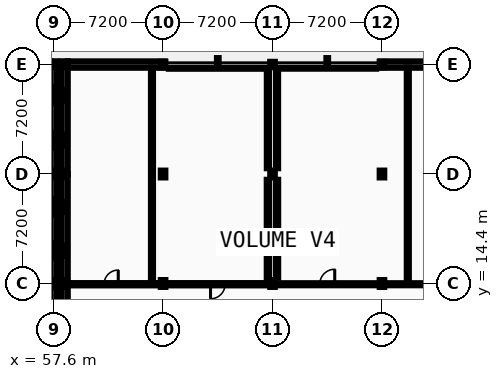
"""IFC4 building model, lengths in metres.
Left out: names, types, materials, properties, quantities, classifications, styles, units other than length and angle.
Written with IfcOpenShell. Run it as: python <this file> out.ifc"""

import sys

from ifc_helpers import new_model, si_unit, direction, frame, frame_2d, origin, origin_2d, place, context, subcontext, project, spatial, rectangle, i_section, extrude, element, fill, save


model = new_model("IFC4")
c1 = context("Model", 3, precision=1e-05, world=origin(), true_north=direction((0.0, 1.0)))
c2 = subcontext(c1, "Body", "Model", "MODEL_VIEW")
j1 = project(units=[si_unit("LENGTHUNIT", "METRE"), si_unit("PLANEANGLEUNIT", "RADIAN")], contexts=[c1])
p1 = place(None, origin())
s1 = spatial("IfcSite", under=j1, at=p1, CompositionType="ELEMENT")
p2 = place(p1, origin())
s2 = spatial("IfcBuilding", under=s1, at=p2, CompositionType="ELEMENT")
p3 = place(p2, origin())
s3 = spatial("IfcBuildingStorey", under=s2, at=p3, CompositionType="ELEMENT", Elevation=0.0)
for number, where, z_axis, x_axis in (
    (1, (57.6, 14.4, 0.0), (0.0, 0.0, 1.0), (1.0, 0.0, 0.0)),
    (2, (57.6, 21.6, 0.0), (0.0, 0.0, 1.0), (1.0, 0.0, 0.0)),
):
    element("IfcColumn", number, at=place(p3, frame(where, z_axis=z_axis, x_axis=x_axis)), inside=s3, PredefinedType="COLUMN", context=c2, shape_type="SweptSolid", body=[
        extrude(i_section(OverallWidth=0.3, OverallDepth=0.45, WebThickness=0.014, FlangeThickness=0.026, FilletRadius=0.027, at=origin_2d()), origin(), (0.0, 0.0, 1.0), 5.2),
    ])
p4 = place(p3, frame((57.6, 28.8, 0.0), z_axis=(0.0, 0.0, 1.0), x_axis=(1.0, 0.0, 0.0)))
e3 = element("IfcColumn", 3, at=p4, inside=s3, PredefinedType="COLUMN", context=c2, shape_type="SweptSolid", body=[
    extrude(i_section(OverallWidth=0.3, OverallDepth=0.36, WebThickness=0.012, FlangeThickness=0.022, FilletRadius=0.027, at=origin_2d()), origin(), (0.0, 0.0, 1.0), 5.2),
])
for number, where, z_axis, x_axis in (
    (4, (58.32, 14.4, 0.0), (0.0, 0.0, 1.0), (1.0, 0.0, 0.0)),
    (5, (58.32, 21.6, 0.0), (0.0, 0.0, 1.0), (1.0, 0.0, 0.0)),
):
    element("IfcColumn", number, at=place(p3, frame(where, z_axis=z_axis, x_axis=x_axis)), inside=s3, PredefinedType="COLUMN", context=c2, shape_type="SweptSolid", body=[
        extrude(i_section(OverallWidth=0.3, OverallDepth=0.45, WebThickness=0.014, FlangeThickness=0.026, FilletRadius=0.027, at=origin_2d()), origin(), (0.0, 0.0, 1.0), 5.2),
    ])
p5 = place(p3, frame((58.32, 28.8, 0.0), z_axis=(0.0, 0.0, 1.0), x_axis=(1.0, 0.0, 0.0)))
e6 = element("IfcColumn", 6, at=p5, inside=s3, PredefinedType="COLUMN", context=c2, shape_type="SweptSolid", body=[
    extrude(i_section(OverallWidth=0.3, OverallDepth=0.36, WebThickness=0.012, FlangeThickness=0.022, FilletRadius=0.027, at=origin_2d()), origin(), (0.0, 0.0, 1.0), 5.2),
])
for number, where, z_axis, x_axis in (
    (7, (64.8, 14.4, 0.0), (0.0, 0.0, 1.0), (1.0, 0.0, 0.0)),
    (8, (64.8, 21.6, 0.0), (0.0, 0.0, 1.0), (1.0, 0.0, 0.0)),
):
    element("IfcColumn", number, at=place(p3, frame(where, z_axis=z_axis, x_axis=x_axis)), inside=s3, PredefinedType="COLUMN", context=c2, shape_type="SweptSolid", body=[
        extrude(i_section(OverallWidth=0.3, OverallDepth=0.45, WebThickness=0.014, FlangeThickness=0.026, FilletRadius=0.027, at=origin_2d()), origin(), (0.0, 0.0, 1.0), 5.2),
    ])
p6 = place(p3, frame((64.8, 28.8, 0.0), z_axis=(0.0, 0.0, 1.0), x_axis=(1.0, 0.0, 0.0)))
e9 = element("IfcColumn", 9, at=p6, inside=s3, PredefinedType="COLUMN", context=c2, shape_type="SweptSolid", body=[
    extrude(i_section(OverallWidth=0.3, OverallDepth=0.36, WebThickness=0.012, FlangeThickness=0.022, FilletRadius=0.027, at=origin_2d()), origin(), (0.0, 0.0, 1.0), 5.2),
])
for number, where, z_axis, x_axis in (
    (10, (72.0, 14.4, 0.0), (0.0, 0.0, 1.0), (1.0, 0.0, 0.0)),
    (11, (72.0, 21.6, 0.0), (0.0, 0.0, 1.0), (1.0, 0.0, 0.0)),
):
    element("IfcColumn", number, at=place(p3, frame(where, z_axis=z_axis, x_axis=x_axis)), inside=s3, PredefinedType="COLUMN", context=c2, shape_type="SweptSolid", body=[
        extrude(i_section(OverallWidth=0.3, OverallDepth=0.45, WebThickness=0.014, FlangeThickness=0.026, FilletRadius=0.027, at=origin_2d()), origin(), (0.0, 0.0, 1.0), 5.2),
    ])
p7 = place(p3, frame((72.0, 28.8, 0.0), z_axis=(0.0, 0.0, 1.0), x_axis=(1.0, 0.0, 0.0)))
e12 = element("IfcColumn", 12, at=p7, inside=s3, PredefinedType="COLUMN", context=c2, shape_type="SweptSolid", body=[
    extrude(i_section(OverallWidth=0.3, OverallDepth=0.36, WebThickness=0.012, FlangeThickness=0.022, FilletRadius=0.027, at=origin_2d()), origin(), (0.0, 0.0, 1.0), 5.2),
])
for number, where, z_axis, x_axis in (
    (13, (79.2, 14.4, 0.0), (0.0, 0.0, 1.0), (1.0, 0.0, 0.0)),
    (14, (79.2, 21.6, 0.0), (0.0, 0.0, 1.0), (1.0, 0.0, 0.0)),
):
    element("IfcColumn", number, at=place(p3, frame(where, z_axis=z_axis, x_axis=x_axis)), inside=s3, PredefinedType="COLUMN", context=c2, shape_type="SweptSolid", body=[
        extrude(i_section(OverallWidth=0.3, OverallDepth=0.45, WebThickness=0.014, FlangeThickness=0.026, FilletRadius=0.027, at=origin_2d()), origin(), (0.0, 0.0, 1.0), 5.2),
    ])
p8 = place(p3, frame((79.2, 28.8, 0.0), z_axis=(0.0, 0.0, 1.0), x_axis=(1.0, 0.0, 0.0)))
e15 = element("IfcColumn", 15, at=p8, inside=s3, PredefinedType="COLUMN", context=c2, shape_type="SweptSolid", body=[
    extrude(i_section(OverallWidth=0.3, OverallDepth=0.36, WebThickness=0.012, FlangeThickness=0.022, FilletRadius=0.027, at=origin_2d()), origin(), (0.0, 0.0, 1.0), 5.2),
])
p9 = place(p3, frame((57.6, 8.9, 0.0), z_axis=(0.0, 0.0, 1.0), x_axis=(0.0, 1.0, 0.0)))
e16 = element("IfcWall", 16, at=p9, inside=s3, PredefinedType="STANDARD", context=c2, shape_type="SweptSolid", body=[
    extrude(rectangle(XDim=5.5, YDim=0.42, at=frame_2d((2.75, 0.0))), origin(), (0.0, 0.0, 1.0), 4.97),
])
p10 = place(p3, frame((57.6, 14.4, 0.0), z_axis=(0.0, 0.0, 1.0), x_axis=(0.0, 1.0, 0.0)))
e17 = element("IfcWall", 17, at=p10, inside=s3, PredefinedType="STANDARD", context=c2, shape_type="SweptSolid", body=[
    extrude(rectangle(XDim=7.2, YDim=0.42, at=frame_2d((3.6, 0.0))), origin(), (0.0, 0.0, 1.0), 4.665),
])
p11 = place(p10, frame((1.56, 0.0, 0.95)))
e18 = element("IfcOpeningElement", 18, at=p11, cuts=e17, PredefinedType="OPENING", context=c2, shape_type="SweptSolid", body=[
    extrude(rectangle(XDim=1.2, YDim=1.296, at=frame_2d((0.6, 0.648))), frame((0.0, 0.22, 0.0), z_axis=(0.0, -1.0, 0.0), x_axis=(1.0, 0.0, 0.0)), (0.0, 0.0, 1.0), 0.44),
])
p12 = place(p10, frame((4.44, 0.0, 0.95)))
e19 = element("IfcOpeningElement", 19, at=p12, cuts=e17, PredefinedType="OPENING", context=c2, shape_type="SweptSolid", body=[
    extrude(rectangle(XDim=1.2, YDim=1.296, at=frame_2d((0.6, 0.648))), frame((0.0, 0.22, 0.0), z_axis=(0.0, -1.0, 0.0), x_axis=(1.0, 0.0, 0.0)), (0.0, 0.0, 1.0), 0.44),
])
p13 = place(p3, frame((57.6, 21.6, 0.0), z_axis=(0.0, 0.0, 1.0), x_axis=(0.0, 1.0, 0.0)))
e20 = element("IfcWall", 20, at=p13, inside=s3, PredefinedType="STANDARD", context=c2, shape_type="SweptSolid", body=[
    extrude(rectangle(XDim=7.41, YDim=0.42, at=frame_2d((3.705, 0.0))), origin(), (0.0, 0.0, 1.0), 4.665),
])
p14 = place(p13, frame((1.606, 0.0, 0.95)))
e21 = element("IfcOpeningElement", 21, at=p14, cuts=e20, PredefinedType="OPENING", context=c2, shape_type="SweptSolid", body=[
    extrude(rectangle(XDim=1.234, YDim=1.296, at=frame_2d((0.617, 0.648))), frame((0.0, 0.22, 0.0), z_axis=(0.0, -1.0, 0.0), x_axis=(1.0, 0.0, 0.0)), (0.0, 0.0, 1.0), 0.44),
])
p15 = place(p13, frame((4.57, 0.0, 0.95)))
e22 = element("IfcOpeningElement", 22, at=p15, cuts=e20, PredefinedType="OPENING", context=c2, shape_type="SweptSolid", body=[
    extrude(rectangle(XDim=1.234, YDim=1.296, at=frame_2d((0.617, 0.648))), frame((0.0, 0.22, 0.0), z_axis=(0.0, -1.0, 0.0), x_axis=(1.0, 0.0, 0.0)), (0.0, 0.0, 1.0), 0.44),
])
p16 = place(p3, frame((64.91, 28.8, 0.0), z_axis=(0.0, 0.0, 1.0), x_axis=(-1.0, 0.0, 0.0)))
e23 = element("IfcWall", 23, at=p16, inside=s3, PredefinedType="STANDARD", context=c2, shape_type="SweptSolid", body=[
    extrude(rectangle(XDim=6.38, YDim=0.42, at=frame_2d((3.19, 0.0))), origin(), (0.0, 0.0, 1.0), 4.665),
])
p17 = place(p3, frame((86.61, 28.8, 0.0), z_axis=(0.0, 0.0, 1.0), x_axis=(-1.0, 0.0, 0.0)))
e24 = element("IfcWall", 24, at=p17, inside=s3, PredefinedType="STANDARD", context=c2, shape_type="SweptSolid", body=[
    extrude(rectangle(XDim=7.52, YDim=0.42, at=frame_2d((3.76, 0.0))), origin(), (0.0, 0.0, 1.0), 4.665),
])
p18 = place(p17, frame((1.456, 0.0, 1.2)))
e25 = element("IfcOpeningElement", 25, at=p18, cuts=e24, PredefinedType="OPENING", context=c2, shape_type="SweptSolid", body=[
    extrude(rectangle(XDim=1.6, YDim=1.4, at=frame_2d((0.8, 0.7))), frame((0.0, 0.22, 0.0), z_axis=(0.0, -1.0, 0.0), x_axis=(1.0, 0.0, 0.0)), (0.0, 0.0, 1.0), 0.44),
])
p19 = place(p3, frame((58.32, 14.4, 0.0), z_axis=(0.0, 0.0, 1.0), x_axis=(0.0, -1.0, 0.0)))
e26 = element("IfcWall", 26, at=p19, inside=s3, PredefinedType="STANDARD", context=c2, shape_type="SweptSolid", body=[
    extrude(rectangle(XDim=5.5, YDim=0.42, at=frame_2d((2.75, 0.0))), origin(), (0.0, 0.0, 1.0), 4.97),
])
p20 = place(p3, frame((58.32, 21.6, 0.0), z_axis=(0.0, 0.0, 1.0), x_axis=(0.0, -1.0, 0.0)))
e27 = element("IfcWall", 27, at=p20, inside=s3, PredefinedType="STANDARD", context=c2, shape_type="SweptSolid", body=[
    extrude(rectangle(XDim=7.2, YDim=0.42, at=frame_2d((3.6, 0.0))), origin(), (0.0, 0.0, 1.0), 4.665),
])
p21 = place(p20, frame((1.713, 0.0, 0.95)))
e28 = element("IfcOpeningElement", 28, at=p21, cuts=e27, PredefinedType="OPENING", context=c2, shape_type="SweptSolid", body=[
    extrude(rectangle(XDim=0.894, YDim=1.26, at=frame_2d((0.447, 0.63))), frame((0.0, 0.22, 0.0), z_axis=(0.0, -1.0, 0.0), x_axis=(1.0, 0.0, 0.0)), (0.0, 0.0, 1.0), 0.44),
])
p22 = place(p20, frame((4.593, 0.0, 0.95)))
e29 = element("IfcOpeningElement", 29, at=p22, cuts=e27, PredefinedType="OPENING", context=c2, shape_type="SweptSolid", body=[
    extrude(rectangle(XDim=0.894, YDim=1.26, at=frame_2d((0.447, 0.63))), frame((0.0, 0.22, 0.0), z_axis=(0.0, -1.0, 0.0), x_axis=(1.0, 0.0, 0.0)), (0.0, 0.0, 1.0), 0.44),
])
p23 = place(p3, frame((58.32, 29.01, 0.0), z_axis=(0.0, 0.0, 1.0), x_axis=(0.0, -1.0, 0.0)))
e30 = element("IfcWall", 30, at=p23, inside=s3, PredefinedType="STANDARD", context=c2, shape_type="SweptSolid", body=[
    extrude(rectangle(XDim=7.41, YDim=0.42, at=frame_2d((3.705, 0.0))), origin(), (0.0, 0.0, 1.0), 4.665),
])
p24 = place(p23, frame((1.759, 0.0, 0.95)))
e31 = element("IfcOpeningElement", 31, at=p24, cuts=e30, PredefinedType="OPENING", context=c2, shape_type="SweptSolid", body=[
    extrude(rectangle(XDim=0.928, YDim=1.26, at=frame_2d((0.464, 0.63))), frame((0.0, 0.22, 0.0), z_axis=(0.0, -1.0, 0.0), x_axis=(1.0, 0.0, 0.0)), (0.0, 0.0, 1.0), 0.44),
])
p25 = place(p23, frame((4.723, 0.0, 0.95)))
e32 = element("IfcOpeningElement", 32, at=p25, cuts=e30, PredefinedType="OPENING", context=c2, shape_type="SweptSolid", body=[
    extrude(rectangle(XDim=0.928, YDim=1.26, at=frame_2d((0.464, 0.63))), frame((0.0, 0.22, 0.0), z_axis=(0.0, -1.0, 0.0), x_axis=(1.0, 0.0, 0.0)), (0.0, 0.0, 1.0), 0.44),
])
p26 = place(p3, frame((58.7, 14.35, 0.0), z_axis=(0.0, 0.0, 1.0), x_axis=(1.0, 0.0, 0.0)))
e33 = element("IfcWall", 33, at=p26, inside=s3, PredefinedType="PARTITIONING", context=c2, shape_type="SweptSolid", body=[
    extrude(rectangle(XDim=5.72, YDim=0.15, at=frame_2d((2.86, 0.0))), origin(), (0.0, 0.0, 1.0), 4.665),
])
p27 = place(p26, frame((2.219, 0.0, 0.0)))
e34 = element("IfcOpeningElement", 34, at=p27, cuts=e33, PredefinedType="OPENING", context=c2, shape_type="SweptSolid", body=[
    extrude(rectangle(XDim=0.932, YDim=2.096, at=frame_2d((0.466, 1.048))), frame((0.0, 0.085, 0.0), z_axis=(0.0, -1.0, 0.0), x_axis=(1.0, 0.0, 0.0)), (0.0, 0.0, 1.0), 0.17),
])
p28 = place(p3, frame((65.18, 14.35, 0.0), z_axis=(0.0, 0.0, 1.0), x_axis=(1.0, 0.0, 0.0)))
e35 = element("IfcWall", 35, at=p28, inside=s3, PredefinedType="PARTITIONING", context=c2, shape_type="SweptSolid", body=[
    extrude(rectangle(XDim=6.44, YDim=0.15, at=frame_2d((3.22, 0.0))), origin(), (0.0, 0.0, 1.0), 4.665),
])
p29 = place(p28, frame((2.741, 0.0, 0.0)))
e36 = element("IfcOpeningElement", 36, at=p29, cuts=e35, PredefinedType="OPENING", context=c2, shape_type="SweptSolid", body=[
    extrude(rectangle(XDim=0.958, YDim=2.096, at=frame_2d((0.479, 1.048))), frame((0.0, 0.085, 0.0), z_axis=(0.0, -1.0, 0.0), x_axis=(1.0, 0.0, 0.0)), (0.0, 0.0, 1.0), 0.17),
])
p30 = place(p3, frame((72.38, 14.35, 0.0), z_axis=(0.0, 0.0, 1.0), x_axis=(1.0, 0.0, 0.0)))
e37 = element("IfcWall", 37, at=p30, inside=s3, PredefinedType="PARTITIONING", context=c2, shape_type="SweptSolid", body=[
    extrude(rectangle(XDim=6.44, YDim=0.135, at=frame_2d((3.22, 0.0))), origin(), (0.0, 0.0, 1.0), 4.665),
])
p31 = place(p30, frame((2.728, 0.0, 0.0)))
e38 = element("IfcOpeningElement", 38, at=p31, cuts=e37, PredefinedType="OPENING", context=c2, shape_type="SweptSolid", body=[
    extrude(rectangle(XDim=0.984, YDim=2.096, at=frame_2d((0.492, 1.048))), frame((0.0, 0.078, 0.0), z_axis=(0.0, -1.0, 0.0), x_axis=(1.0, 0.0, 0.0)), (0.0, 0.0, 1.0), 0.155),
])
p32 = place(p3, frame((79.58, 14.35, 0.0), z_axis=(0.0, 0.0, 1.0), x_axis=(1.0, 0.0, 0.0)))
e39 = element("IfcWall", 39, at=p32, inside=s3, PredefinedType="PARTITIONING", context=c2, shape_type="SweptSolid", body=[
    extrude(rectangle(XDim=6.44, YDim=0.135, at=frame_2d((3.22, 0.0))), origin(), (0.0, 0.0, 1.0), 4.665),
])
p33 = place(p32, frame((3.427, 0.0, 0.0)))
e40 = element("IfcOpeningElement", 40, at=p33, cuts=e39, PredefinedType="OPENING", context=c2, shape_type="SweptSolid", body=[
    extrude(rectangle(XDim=0.906, YDim=2.096, at=frame_2d((0.453, 1.048))), frame((0.0, 0.078, 0.0), z_axis=(0.0, -1.0, 0.0), x_axis=(1.0, 0.0, 0.0)), (0.0, 0.0, 1.0), 0.155),
])
p34 = place(p3, frame((65.18, 28.6, 0.0), z_axis=(0.0, 0.0, 1.0), x_axis=(1.0, 0.0, 0.0)))
e41 = element("IfcWall", 41, at=p34, inside=s3, PredefinedType="PARTITIONING", context=c2, shape_type="SweptSolid", body=[
    extrude(rectangle(XDim=6.44, YDim=0.15, at=frame_2d((3.22, 0.0))), origin(), (0.0, 0.0, 1.0), 4.665),
])
p35 = place(p3, frame((72.38, 28.6, 0.0), z_axis=(0.0, 0.0, 1.0), x_axis=(1.0, 0.0, 0.0)))
e42 = element("IfcWall", 42, at=p35, inside=s3, PredefinedType="PARTITIONING", context=c2, shape_type="SweptSolid", body=[
    extrude(rectangle(XDim=6.44, YDim=0.142, at=frame_2d((3.22, 0.0))), origin(), (0.0, 0.0, 1.0), 4.665),
])
p36 = place(p3, frame((64.07, 14.425, 0.0), z_axis=(0.0, 0.0, 1.0), x_axis=(0.0, 1.0, 0.0)))
e43 = element("IfcWall", 43, at=p36, inside=s3, PredefinedType="PARTITIONING", context=c2, shape_type="SweptSolid", body=[
    extrude(rectangle(XDim=14.175, YDim=0.135, at=frame_2d((7.087, 0.0))), origin(), (0.0, 0.0, 1.0), 4.97),
])
p37 = place(p3, frame((71.7, 14.78, 0.0), z_axis=(0.0, 0.0, 1.0), x_axis=(0.0, 1.0, 0.0)))
e44 = element("IfcWall", 44, at=p37, inside=s3, PredefinedType="PARTITIONING", context=c2, shape_type="SweptSolid", body=[
    extrude(rectangle(XDim=6.44, YDim=0.16, at=frame_2d((3.22, 0.0))), origin(), (0.0, 0.0, 1.0), 4.665),
])
p38 = place(p3, frame((71.7, 21.98, 0.0), z_axis=(0.0, 0.0, 1.0), x_axis=(0.0, 1.0, 0.0)))
e45 = element("IfcWall", 45, at=p38, inside=s3, PredefinedType="PARTITIONING", context=c2, shape_type="SweptSolid", body=[
    extrude(rectangle(XDim=6.44, YDim=0.15, at=frame_2d((3.22, 0.0))), origin(), (0.0, 0.0, 1.0), 4.665),
])
p39 = place(p3, frame((72.3, 14.78, 0.0), z_axis=(0.0, 0.0, 1.0), x_axis=(0.0, 1.0, 0.0)))
e46 = element("IfcWall", 46, at=p39, inside=s3, PredefinedType="PARTITIONING", context=c2, shape_type="SweptSolid", body=[
    extrude(rectangle(XDim=6.44, YDim=0.142, at=frame_2d((3.22, 0.0))), origin(), (0.0, 0.0, 1.0), 4.665),
])
p40 = place(p3, frame((72.3, 21.98, 0.0), z_axis=(0.0, 0.0, 1.0), x_axis=(0.0, 1.0, 0.0)))
e47 = element("IfcWall", 47, at=p40, inside=s3, PredefinedType="PARTITIONING", context=c2, shape_type="SweptSolid", body=[
    extrude(rectangle(XDim=6.44, YDim=0.135, at=frame_2d((3.22, 0.0))), origin(), (0.0, 0.0, 1.0), 4.97),
])
p41 = place(p3, frame((80.9, 14.417, 0.0), z_axis=(0.0, 0.0, 1.0), x_axis=(0.0, 1.0, 0.0)))
e48 = element("IfcWall", 48, at=p41, inside=s3, PredefinedType="PARTITIONING", context=c2, shape_type="SweptSolid", body=[
    extrude(rectangle(XDim=14.183, YDim=0.135, at=frame_2d((7.091, 0.0))), origin(), (0.0, 0.0, 1.0), 4.97),
])
p42 = place(p11, origin())
e49 = element("IfcWindow", 49, at=p42, inside=s3, PartitioningType="SINGLE_PANEL", PredefinedType="WINDOW", context=c2, shape_type="SweptSolid", body=[
    extrude(rectangle(XDim=1.2, YDim=1.296, at=frame_2d((0.6, 0.648))), frame((0.0, 0.03, 0.0), z_axis=(0.0, -1.0, 0.0), x_axis=(1.0, 0.0, 0.0)), (0.0, 0.0, 1.0), 0.06),
])
fill(e18, e49)
p43 = place(p12, origin())
e50 = element("IfcWindow", 50, at=p43, inside=s3, PartitioningType="SINGLE_PANEL", PredefinedType="WINDOW", context=c2, shape_type="SweptSolid", body=[
    extrude(rectangle(XDim=1.2, YDim=1.296, at=frame_2d((0.6, 0.648))), frame((0.0, 0.03, 0.0), z_axis=(0.0, -1.0, 0.0), x_axis=(1.0, 0.0, 0.0)), (0.0, 0.0, 1.0), 0.06),
])
fill(e19, e50)
p44 = place(p14, origin())
e51 = element("IfcWindow", 51, at=p44, inside=s3, PartitioningType="SINGLE_PANEL", PredefinedType="WINDOW", context=c2, shape_type="SweptSolid", body=[
    extrude(rectangle(XDim=1.234, YDim=1.296, at=frame_2d((0.617, 0.648))), frame((0.0, 0.03, 0.0), z_axis=(0.0, -1.0, 0.0), x_axis=(1.0, 0.0, 0.0)), (0.0, 0.0, 1.0), 0.06),
])
fill(e21, e51)
p45 = place(p15, origin())
e52 = element("IfcWindow", 52, at=p45, inside=s3, PartitioningType="SINGLE_PANEL", PredefinedType="WINDOW", context=c2, shape_type="SweptSolid", body=[
    extrude(rectangle(XDim=1.234, YDim=1.296, at=frame_2d((0.617, 0.648))), frame((0.0, 0.03, 0.0), z_axis=(0.0, -1.0, 0.0), x_axis=(1.0, 0.0, 0.0)), (0.0, 0.0, 1.0), 0.06),
])
fill(e22, e52)
p46 = place(p21, origin())
e53 = element("IfcWindow", 53, at=p46, inside=s3, PartitioningType="SINGLE_PANEL", PredefinedType="WINDOW", context=c2, shape_type="SweptSolid", body=[
    extrude(rectangle(XDim=0.894, YDim=1.26, at=frame_2d((0.447, 0.63))), frame((0.0, 0.03, 0.0), z_axis=(0.0, -1.0, 0.0), x_axis=(1.0, 0.0, 0.0)), (0.0, 0.0, 1.0), 0.06),
])
fill(e28, e53)
p47 = place(p22, origin())
e54 = element("IfcWindow", 54, at=p47, inside=s3, PartitioningType="SINGLE_PANEL", PredefinedType="WINDOW", context=c2, shape_type="SweptSolid", body=[
    extrude(rectangle(XDim=0.894, YDim=1.26, at=frame_2d((0.447, 0.63))), frame((0.0, 0.03, 0.0), z_axis=(0.0, -1.0, 0.0), x_axis=(1.0, 0.0, 0.0)), (0.0, 0.0, 1.0), 0.06),
])
fill(e29, e54)
p48 = place(p24, origin())
e55 = element("IfcWindow", 55, at=p48, inside=s3, PartitioningType="SINGLE_PANEL", PredefinedType="WINDOW", context=c2, shape_type="SweptSolid", body=[
    extrude(rectangle(XDim=0.928, YDim=1.26, at=frame_2d((0.464, 0.63))), frame((0.0, 0.03, 0.0), z_axis=(0.0, -1.0, 0.0), x_axis=(1.0, 0.0, 0.0)), (0.0, 0.0, 1.0), 0.06),
])
fill(e31, e55)
p49 = place(p25, origin())
e56 = element("IfcWindow", 56, at=p49, inside=s3, PartitioningType="SINGLE_PANEL", PredefinedType="WINDOW", context=c2, shape_type="SweptSolid", body=[
    extrude(rectangle(XDim=0.928, YDim=1.26, at=frame_2d((0.464, 0.63))), frame((0.0, 0.03, 0.0), z_axis=(0.0, -1.0, 0.0), x_axis=(1.0, 0.0, 0.0)), (0.0, 0.0, 1.0), 0.06),
])
fill(e32, e56)
p50 = place(p27, frame((0.932, 0.0, 0.0), z_axis=(0.0, 0.0, 1.0), x_axis=(-1.0, 0.0, 0.0)))
e57 = element("IfcDoor", 57, at=p50, inside=s3, OperationType="SINGLE_SWING_RIGHT", PredefinedType="DOOR", context=c2, shape_type="SweptSolid", body=[
    extrude(rectangle(XDim=0.932, YDim=2.096, at=frame_2d((0.466, 1.048))), frame((0.0, 0.025, 0.0), z_axis=(0.0, -1.0, 0.0), x_axis=(1.0, 0.0, 0.0)), (0.0, 0.0, 1.0), 0.05),
])
fill(e34, e57)
p51 = place(p29, frame((0.958, 0.0, 0.0), z_axis=(0.0, 0.0, 1.0), x_axis=(-1.0, 0.0, 0.0)))
e58 = element("IfcDoor", 58, at=p51, inside=s3, OperationType="SINGLE_SWING_LEFT", PredefinedType="DOOR", context=c2, shape_type="SweptSolid", body=[
    extrude(rectangle(XDim=0.958, YDim=2.096, at=frame_2d((0.479, 1.048))), frame((0.0, 0.025, 0.0), z_axis=(0.0, -1.0, 0.0), x_axis=(1.0, 0.0, 0.0)), (0.0, 0.0, 1.0), 0.05),
])
fill(e36, e58)
p52 = place(p31, frame((0.984, 0.0, 0.0), z_axis=(0.0, 0.0, 1.0), x_axis=(-1.0, 0.0, 0.0)))
e59 = element("IfcDoor", 59, at=p52, inside=s3, OperationType="SINGLE_SWING_RIGHT", PredefinedType="DOOR", context=c2, shape_type="SweptSolid", body=[
    extrude(rectangle(XDim=0.984, YDim=2.096, at=frame_2d((0.492, 1.048))), frame((0.0, 0.025, 0.0), z_axis=(0.0, -1.0, 0.0), x_axis=(1.0, 0.0, 0.0)), (0.0, 0.0, 1.0), 0.05),
])
fill(e38, e59)
save(model, sys.argv[1])
